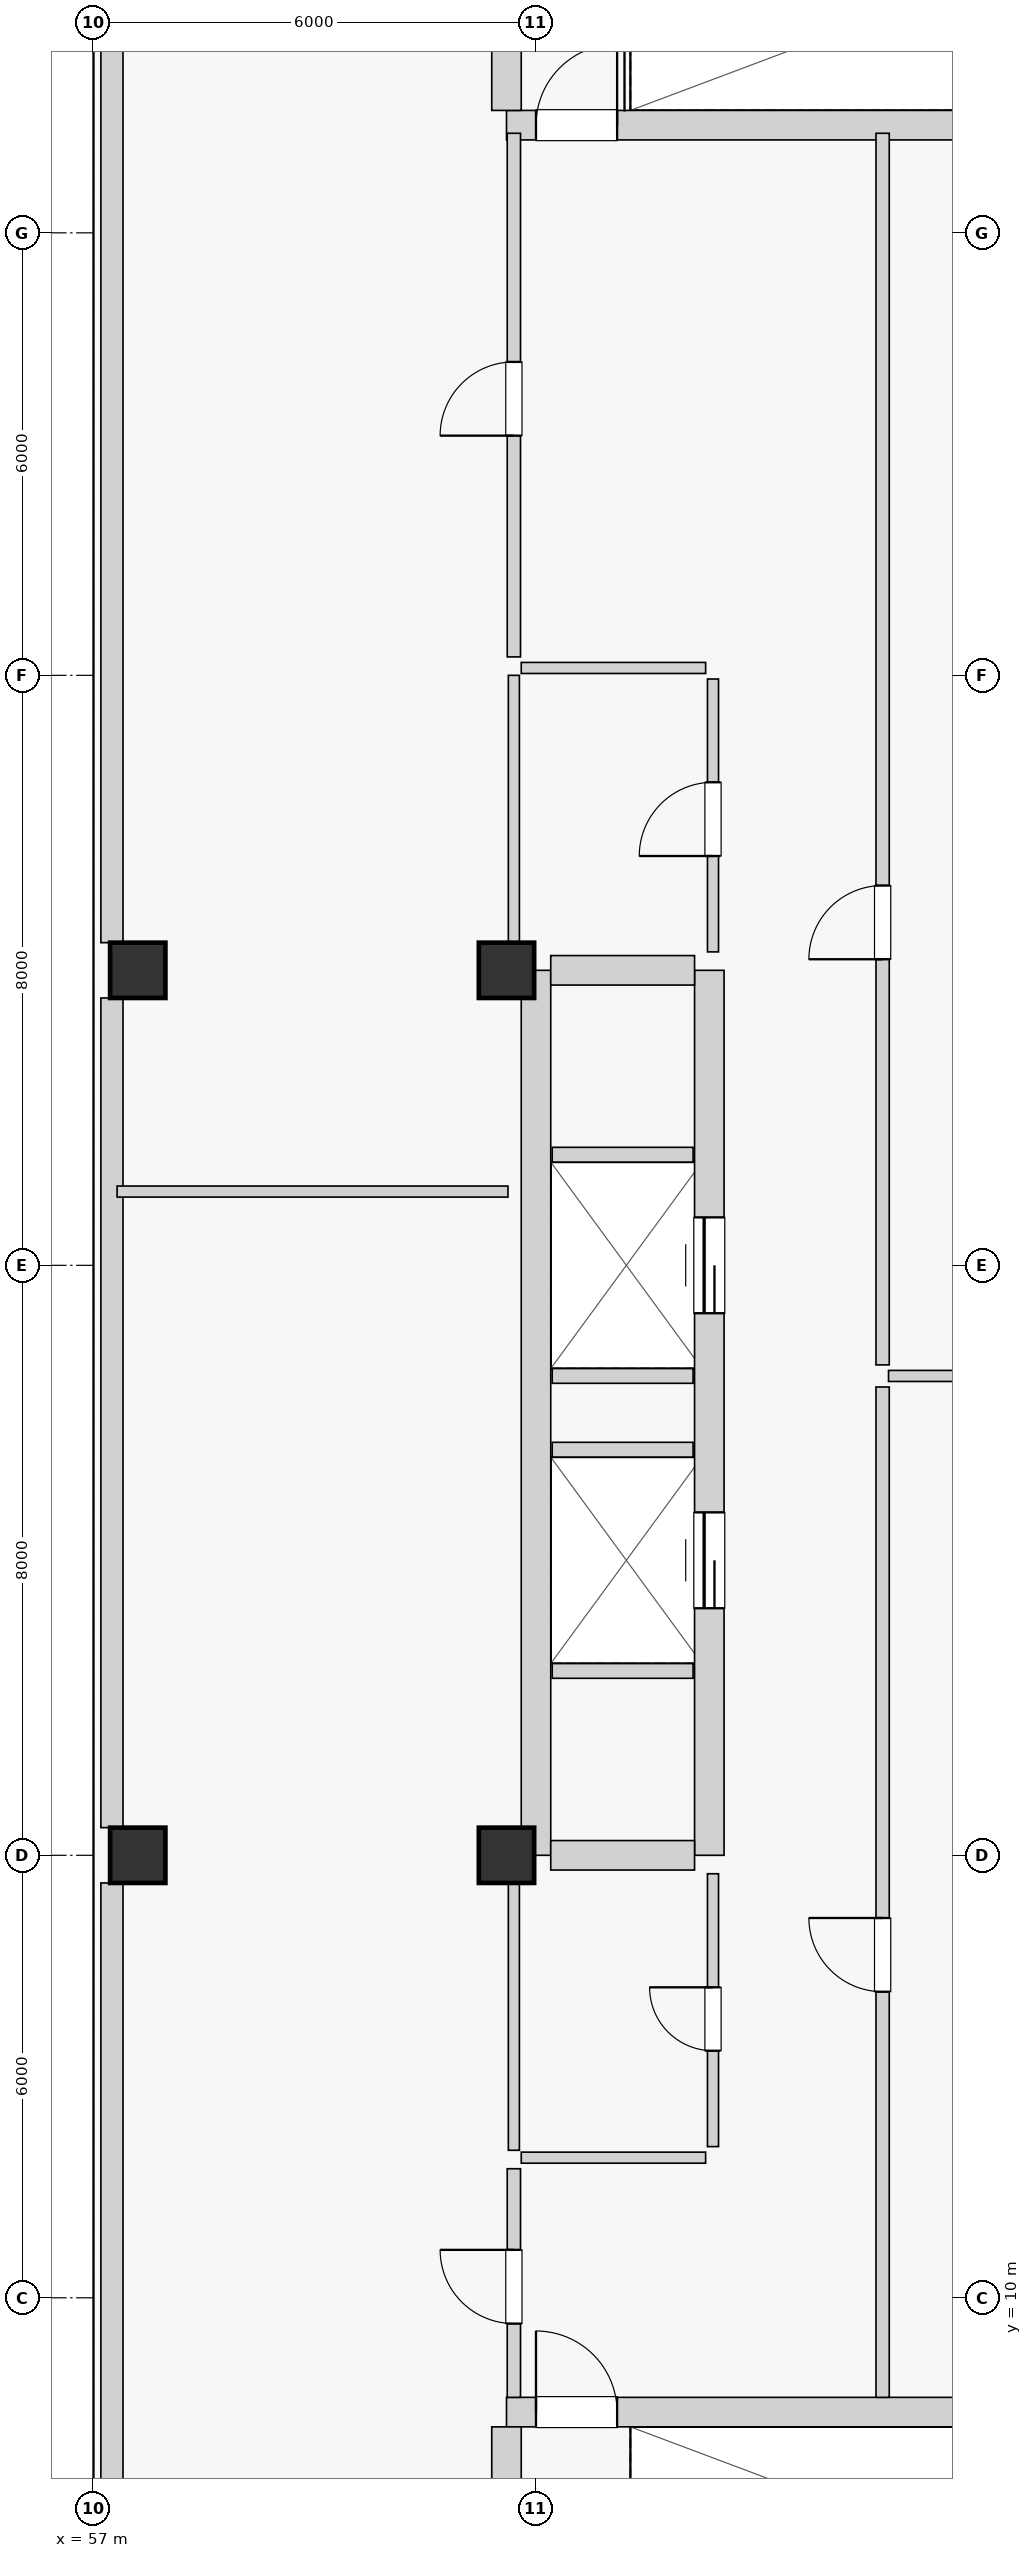
"""IFC4 building model, lengths in metres.
Left out: names, types, materials, properties, quantities, classifications, styles, units other than length and angle.
Written with IfcOpenShell. Run it as: python <this file> out.ifc"""

import sys

from ifc_helpers import new_model, si_unit, direction, frame, frame_2d, origin, origin_2d, place, context, subcontext, project, spatial, rectangle, extrude, source, transform, mapped, element, fill, save


model = new_model("IFC4")
c1 = context("Model", 3, precision=1e-05, world=origin(), true_north=direction((0.0, 1.0)))
c2 = subcontext(c1, "Body", "Model", "MODEL_VIEW")
j1 = project(units=[si_unit("LENGTHUNIT", "METRE"), si_unit("PLANEANGLEUNIT", "RADIAN")], contexts=[c1])
p1 = place(None, origin())
s1 = spatial("IfcSite", under=j1, at=p1, CompositionType="ELEMENT")
p2 = place(p1, origin())
s2 = spatial("IfcBuilding", under=s1, at=p2, CompositionType="ELEMENT")
p3 = place(p2, frame((0.0, 0.0, 18.4)))
s3 = spatial("IfcBuildingStorey", under=s2, at=p3, CompositionType="ELEMENT", Elevation=18.4)
for number, where, z_axis, x_axis in (
    (1, (57.6, 16.0, 0.0), (0.0, 0.0, 1.0), (1.0, 0.0, 0.0)),
    (2, (57.6, 28.0, 0.0), (0.0, 0.0, 1.0), (1.0, 0.0, 0.0)),
    (3, (62.6, 16.0, 0.0), (0.0, 0.0, 1.0), (1.0, 0.0, 0.0)),
    (4, (62.6, 28.0, 0.0), (0.0, 0.0, 1.0), (1.0, 0.0, 0.0)),
):
    element("IfcColumn", number, at=place(p3, frame(where, z_axis=z_axis, x_axis=x_axis)), inside=s3, PredefinedType="COLUMN", context=c2, shape_type="SweptSolid", body=[
        extrude(rectangle(XDim=0.75, YDim=0.75, at=origin_2d()), origin(), (0.0, 0.0, 1.0), 4.4),
    ])
p4 = place(p3, frame((57.25, 43.6, 0.0), z_axis=(0.0, 0.0, 1.0), x_axis=(0.0, -1.0, 0.0)))
e5 = element("IfcWall", 5, at=p4, inside=s3, PredefinedType="SOLIDWALL", context=c2, shape_type="SweptSolid", body=[
    extrude(rectangle(XDim=15.225, YDim=0.3, at=frame_2d((7.613, 0.0))), origin(), (0.0, 0.0, 1.0), 3.39),
])
p5 = place(p4, frame((7.0, 0.0, 0.85)))
e6 = element("IfcOpeningElement", 6, at=p5, cuts=e5, PredefinedType="OPENING", context=c2, shape_type="SweptSolid", body=[
    extrude(rectangle(XDim=1.8, YDim=1.65, at=frame_2d((0.9, 0.825))), frame((0.0, 0.16, 0.0), z_axis=(0.0, -1.0, 0.0), x_axis=(1.0, 0.0, 0.0)), (0.0, 0.0, 1.0), 0.32),
])
p6 = place(p3, frame((57.25, 27.625, 0.0), z_axis=(0.0, 0.0, 1.0), x_axis=(0.0, -1.0, 0.0)))
e7 = element("IfcWall", 7, at=p6, inside=s3, PredefinedType="SOLIDWALL", context=c2, shape_type="SweptSolid", body=[
    extrude(rectangle(XDim=11.25, YDim=0.3, at=frame_2d((5.625, 0.0))), origin(), (0.0, 0.0, 1.0), 3.39),
])
p7 = place(p6, frame((4.725, 0.0, 0.85)))
e8 = element("IfcOpeningElement", 8, at=p7, cuts=e7, PredefinedType="OPENING", context=c2, shape_type="SweptSolid", body=[
    extrude(rectangle(XDim=1.8, YDim=1.65, at=frame_2d((0.9, 0.825))), frame((0.0, 0.16, 0.0), z_axis=(0.0, -1.0, 0.0), x_axis=(1.0, 0.0, 0.0)), (0.0, 0.0, 1.0), 0.32),
])
p8 = place(p3, frame((57.25, 15.625, 0.0), z_axis=(0.0, 0.0, 1.0), x_axis=(0.0, -1.0, 0.0)))
e9 = element("IfcWall", 9, at=p8, inside=s3, PredefinedType="SOLIDWALL", context=c2, shape_type="SweptSolid", body=[
    extrude(rectangle(XDim=11.225, YDim=0.3, at=frame_2d((5.613, 0.0))), origin(), (0.0, 0.0, 1.0), 3.39),
])
p9 = place(p8, frame((4.125, 0.0, 0.85)))
e10 = element("IfcOpeningElement", 10, at=p9, cuts=e9, PredefinedType="OPENING", context=c2, shape_type="SweptSolid", body=[
    extrude(rectangle(XDim=2.4, YDim=1.8, at=frame_2d((1.2, 0.9))), frame((0.0, 0.16, 0.0), z_axis=(0.0, -1.0, 0.0), x_axis=(1.0, 0.0, 0.0)), (0.0, 0.0, 1.0), 0.32),
])
p10 = place(p3, frame((63.0, 16.0, 0.0), z_axis=(0.0, 0.0, 1.0), x_axis=(0.0, 1.0, 0.0)))
e11 = element("IfcWall", 11, at=p10, inside=s3, PredefinedType="SHEAR", context=c2, shape_type="SweptSolid", body=[
    extrude(rectangle(XDim=12.0, YDim=0.4, at=frame_2d((6.0, 0.0))), origin(), (0.0, 0.0, 1.0), 4.14),
])
p11 = place(p3, frame((65.35, 16.0, 0.0), z_axis=(0.0, 0.0, 1.0), x_axis=(0.0, 1.0, 0.0)))
e12 = element("IfcWall", 12, at=p11, inside=s3, PredefinedType="SHEAR", context=c2, shape_type="SweptSolid", body=[
    extrude(rectangle(XDim=12.0, YDim=0.4, at=frame_2d((6.0, 0.0))), origin(), (0.0, 0.0, 1.0), 4.14),
])
p12 = place(p11, frame((3.35, 0.0, 0.0)))
e13 = element("IfcOpeningElement", 13, at=p12, cuts=e12, PredefinedType="OPENING", context=c2, shape_type="SweptSolid", body=[
    extrude(rectangle(XDim=1.3, YDim=2.25, at=frame_2d((0.65, 1.125))), frame((0.0, 0.21, 0.0), z_axis=(0.0, -1.0, 0.0), x_axis=(1.0, 0.0, 0.0)), (0.0, 0.0, 1.0), 0.42),
])
p13 = place(p11, frame((7.35, 0.0, 0.0)))
e14 = element("IfcOpeningElement", 14, at=p13, cuts=e12, PredefinedType="OPENING", context=c2, shape_type="SweptSolid", body=[
    extrude(rectangle(XDim=1.3, YDim=2.25, at=frame_2d((0.65, 1.125))), frame((0.0, 0.21, 0.0), z_axis=(0.0, -1.0, 0.0), x_axis=(1.0, 0.0, 0.0)), (0.0, 0.0, 1.0), 0.42),
])
for number, where, z_axis, x_axis in (
    (15, (63.2, 16.0, 0.0), (0.0, 0.0, 1.0), (1.0, 0.0, 0.0)),
    (16, (63.2, 28.0, 0.0), (0.0, 0.0, 1.0), (1.0, 0.0, 0.0)),
):
    element("IfcWall", number, at=place(p3, frame(where, z_axis=z_axis, x_axis=x_axis)), inside=s3, PredefinedType="SHEAR", context=c2, shape_type="SweptSolid", body=[
        extrude(rectangle(XDim=1.95, YDim=0.4, at=frame_2d((0.975, 0.0))), origin(), (0.0, 0.0, 1.0), 4.14),
    ])
for number, where, z_axis, x_axis in (
    (17, (63.22, 18.5, 0.0), (0.0, 0.0, 1.0), (1.0, 0.0, 0.0)),
    (18, (63.22, 21.5, 0.0), (0.0, 0.0, 1.0), (1.0, 0.0, 0.0)),
    (19, (63.22, 22.5, 0.0), (0.0, 0.0, 1.0), (1.0, 0.0, 0.0)),
    (20, (63.22, 25.5, 0.0), (0.0, 0.0, 1.0), (1.0, 0.0, 0.0)),
):
    element("IfcWall", number, at=place(p3, frame(where, z_axis=z_axis, x_axis=x_axis)), inside=s3, PredefinedType="SOLIDWALL", context=c2, shape_type="SweptSolid", body=[
        extrude(rectangle(XDim=1.91, YDim=0.2, at=frame_2d((0.955, 0.0))), origin(), (0.0, 0.0, 1.0), 4.14),
    ])
p14 = place(p3, frame((62.6, 8.45, 0.0), z_axis=(0.0, 0.0, 1.0), x_axis=(1.0, 0.0, 0.0)))
e21 = element("IfcWall", 21, at=p14, inside=s3, PredefinedType="SHEAR", context=c2, shape_type="SweptSolid", body=[
    extrude(rectangle(XDim=10.0, YDim=0.4, at=frame_2d((5.0, 0.0))), origin(), (0.0, 0.0, 1.0), 4.14),
])
p15 = place(p14, frame((0.4, 0.0, 0.0)))
e22 = element("IfcOpeningElement", 22, at=p15, cuts=e21, PredefinedType="OPENING", context=c2, shape_type="SweptSolid", body=[
    extrude(rectangle(XDim=1.1, YDim=2.03, at=frame_2d((0.55, 1.015))), frame((0.0, 0.21, 0.0), z_axis=(0.0, -1.0, 0.0), x_axis=(1.0, 0.0, 0.0)), (0.0, 0.0, 1.0), 0.42),
])
p16 = place(p3, frame((62.6, 5.2, 0.0), z_axis=(0.0, 0.0, 1.0), x_axis=(0.0, 1.0, 0.0)))
e23 = element("IfcWall", 23, at=p16, inside=s3, PredefinedType="SHEAR", context=c2, shape_type="SweptSolid", body=[
    extrude(rectangle(XDim=3.05, YDim=0.4, at=frame_2d((1.525, 0.0))), origin(), (0.0, 0.0, 1.0), 4.14),
])
p17 = place(p3, frame((62.6, 39.46, 0.0), z_axis=(0.0, 0.0, 1.0), x_axis=(1.0, 0.0, 0.0)))
e24 = element("IfcWall", 24, at=p17, inside=s3, PredefinedType="SHEAR", context=c2, shape_type="SweptSolid", body=[
    extrude(rectangle(XDim=10.0, YDim=0.4, at=frame_2d((5.0, 0.0))), origin(), (0.0, 0.0, 1.0), 4.14),
])
p18 = place(p17, frame((0.4, 0.0, 0.0)))
e25 = element("IfcOpeningElement", 25, at=p18, cuts=e24, PredefinedType="OPENING", context=c2, shape_type="SweptSolid", body=[
    extrude(rectangle(XDim=1.1, YDim=2.03, at=frame_2d((0.55, 1.015))), frame((0.0, 0.21, 0.0), z_axis=(0.0, -1.0, 0.0), x_axis=(1.0, 0.0, 0.0)), (0.0, 0.0, 1.0), 0.42),
])
p19 = place(p3, frame((62.6, 39.66, 0.0), z_axis=(0.0, 0.0, 1.0), x_axis=(0.0, 1.0, 0.0)))
e26 = element("IfcWall", 26, at=p19, inside=s3, PredefinedType="SHEAR", context=c2, shape_type="SweptSolid", body=[
    extrude(rectangle(XDim=3.05, YDim=0.4, at=frame_2d((1.525, 0.0))), origin(), (0.0, 0.0, 1.0), 4.14),
])
p20 = place(p3, frame((62.8, 11.9, 0.0), z_axis=(0.0, 0.0, 1.0), x_axis=(1.0, 0.0, 0.0)))
e27 = element("IfcWall", 27, at=p20, inside=s3, PredefinedType="PARTITIONING", context=c2, shape_type="SweptSolid", body=[
    extrude(rectangle(XDim=2.5, YDim=0.15, at=frame_2d((1.25, 0.0))), origin(), (0.0, 0.0, 1.0), 4.14),
])
p21 = place(p3, frame((62.7, 12.0, 0.0), z_axis=(0.0, 0.0, 1.0), x_axis=(0.0, 1.0, 0.0)))
e28 = element("IfcWall", 28, at=p21, inside=s3, PredefinedType="PARTITIONING", context=c2, shape_type="SweptSolid", body=[
    extrude(rectangle(XDim=3.8, YDim=0.15, at=frame_2d((1.9, 0.0))), origin(), (0.0, 0.0, 1.0), 3.54),
])
p22 = place(p3, frame((65.4, 12.05, 0.0), z_axis=(0.0, 0.0, 1.0), x_axis=(0.0, 1.0, 0.0)))
e29 = element("IfcWall", 29, at=p22, inside=s3, PredefinedType="PARTITIONING", context=c2, shape_type="SweptSolid", body=[
    extrude(rectangle(XDim=3.7, YDim=0.15, at=frame_2d((1.85, 0.0))), origin(), (0.0, 0.0, 1.0), 4.14),
])
p23 = place(p22, frame((1.3, 0.0, 0.0)))
e30 = element("IfcOpeningElement", 30, at=p23, cuts=e29, PredefinedType="OPENING", context=c2, shape_type="SweptSolid", body=[
    extrude(rectangle(XDim=0.86, YDim=2.01, at=frame_2d((0.43, 1.005))), frame((0.0, 0.085, 0.0), z_axis=(0.0, -1.0, 0.0), x_axis=(1.0, 0.0, 0.0)), (0.0, 0.0, 1.0), 0.17),
])
p24 = place(p3, frame((62.8, 32.1, 0.0), z_axis=(0.0, 0.0, 1.0), x_axis=(1.0, 0.0, 0.0)))
e31 = element("IfcWall", 31, at=p24, inside=s3, PredefinedType="PARTITIONING", context=c2, shape_type="SweptSolid", body=[
    extrude(rectangle(XDim=2.5, YDim=0.15, at=frame_2d((1.25, 0.0))), origin(), (0.0, 0.0, 1.0), 4.14),
])
p25 = place(p3, frame((62.7, 28.2, 0.0), z_axis=(0.0, 0.0, 1.0), x_axis=(0.0, 1.0, 0.0)))
e32 = element("IfcWall", 32, at=p25, inside=s3, PredefinedType="PARTITIONING", context=c2, shape_type="SweptSolid", body=[
    extrude(rectangle(XDim=3.8, YDim=0.15, at=frame_2d((1.9, 0.0))), origin(), (0.0, 0.0, 1.0), 3.54),
])
p26 = place(p3, frame((65.4, 28.25, 0.0), z_axis=(0.0, 0.0, 1.0), x_axis=(0.0, 1.0, 0.0)))
e33 = element("IfcWall", 33, at=p26, inside=s3, PredefinedType="PARTITIONING", context=c2, shape_type="SweptSolid", body=[
    extrude(rectangle(XDim=3.7, YDim=0.15, at=frame_2d((1.85, 0.0))), origin(), (0.0, 0.0, 1.0), 4.14),
])
p27 = place(p26, frame((1.3, 0.0, 0.0)))
e34 = element("IfcOpeningElement", 34, at=p27, cuts=e33, PredefinedType="OPENING", context=c2, shape_type="SweptSolid", body=[
    extrude(rectangle(XDim=1.0, YDim=2.01, at=frame_2d((0.5, 1.005))), frame((0.0, 0.085, 0.0), z_axis=(0.0, -1.0, 0.0), x_axis=(1.0, 0.0, 0.0)), (0.0, 0.0, 1.0), 0.17),
])
p28 = place(p3, frame((62.7, 8.65, 0.0), z_axis=(0.0, 0.0, 1.0), x_axis=(0.0, 1.0, 0.0)))
e35 = element("IfcWall", 35, at=p28, inside=s3, PredefinedType="PARTITIONING", context=c2, shape_type="SweptSolid", body=[
    extrude(rectangle(XDim=3.1, YDim=0.18, at=frame_2d((1.55, 0.0))), origin(), (0.0, 0.0, 1.0), 3.54),
])
p29 = place(p28, frame((1.0, 0.0, 0.0)))
e36 = element("IfcOpeningElement", 36, at=p29, cuts=e35, PredefinedType="OPENING", context=c2, shape_type="SweptSolid", body=[
    extrude(rectangle(XDim=1.0, YDim=2.01, at=frame_2d((0.5, 1.005))), frame((0.0, 0.1, 0.0), z_axis=(0.0, -1.0, 0.0), x_axis=(1.0, 0.0, 0.0)), (0.0, 0.0, 1.0), 0.2),
])
p30 = place(p3, frame((62.7, 32.25, 0.0), z_axis=(0.0, 0.0, 1.0), x_axis=(0.0, 1.0, 0.0)))
e37 = element("IfcWall", 37, at=p30, inside=s3, PredefinedType="PARTITIONING", context=c2, shape_type="SweptSolid", body=[
    extrude(rectangle(XDim=7.1, YDim=0.18, at=frame_2d((3.55, 0.0))), origin(), (0.0, 0.0, 1.0), 3.54),
])
p31 = place(p30, frame((3.0, 0.0, 0.0)))
e38 = element("IfcOpeningElement", 38, at=p31, cuts=e37, PredefinedType="OPENING", context=c2, shape_type="SweptSolid", body=[
    extrude(rectangle(XDim=1.0, YDim=2.01, at=frame_2d((0.5, 1.005))), frame((0.0, 0.1, 0.0), z_axis=(0.0, -1.0, 0.0), x_axis=(1.0, 0.0, 0.0)), (0.0, 0.0, 1.0), 0.2),
])
p32 = place(p3, frame((57.32, 25.0, 0.0), z_axis=(0.0, 0.0, 1.0), x_axis=(1.0, 0.0, 0.0)))
e39 = element("IfcWall", 39, at=p32, inside=s3, PredefinedType="PARTITIONING", context=c2, shape_type="SweptSolid", body=[
    extrude(rectangle(XDim=5.3, YDim=0.15, at=frame_2d((2.65, 0.0))), origin(), (0.0, 0.0, 1.0), 4.14),
])
p33 = place(p3, frame((67.7, 8.65, 0.0), z_axis=(0.0, 0.0, 1.0), x_axis=(0.0, 1.0, 0.0)))
e40 = element("IfcWall", 40, at=p33, inside=s3, PredefinedType="PARTITIONING", context=c2, shape_type="SweptSolid", body=[
    extrude(rectangle(XDim=13.7, YDim=0.18, at=frame_2d((6.85, 0.0))), origin(), (0.0, 0.0, 1.0), 4.14),
])
p34 = place(p33, frame((5.5, 0.0, 0.0)))
e41 = element("IfcOpeningElement", 41, at=p34, cuts=e40, PredefinedType="OPENING", context=c2, shape_type="SweptSolid", body=[
    extrude(rectangle(XDim=1.0, YDim=2.01, at=frame_2d((0.5, 1.005))), frame((0.0, 0.1, 0.0), z_axis=(0.0, -1.0, 0.0), x_axis=(1.0, 0.0, 0.0)), (0.0, 0.0, 1.0), 0.2),
])
p35 = place(p3, frame((67.7, 22.65, 0.0), z_axis=(0.0, 0.0, 1.0), x_axis=(0.0, 1.0, 0.0)))
e42 = element("IfcWall", 42, at=p35, inside=s3, PredefinedType="PARTITIONING", context=c2, shape_type="SweptSolid", body=[
    extrude(rectangle(XDim=16.7, YDim=0.18, at=frame_2d((8.35, 0.0))), origin(), (0.0, 0.0, 1.0), 4.14),
])
p36 = place(p35, frame((5.5, 0.0, 0.0)))
e43 = element("IfcOpeningElement", 43, at=p36, cuts=e42, PredefinedType="OPENING", context=c2, shape_type="SweptSolid", body=[
    extrude(rectangle(XDim=1.0, YDim=2.01, at=frame_2d((0.5, 1.005))), frame((0.0, 0.1, 0.0), z_axis=(0.0, -1.0, 0.0), x_axis=(1.0, 0.0, 0.0)), (0.0, 0.0, 1.0), 0.2),
])
p37 = place(p3, frame((67.78, 22.5, 0.0), z_axis=(0.0, 0.0, 1.0), x_axis=(1.0, 0.0, 0.0)))
e44 = element("IfcWall", 44, at=p37, inside=s3, PredefinedType="PARTITIONING", context=c2, shape_type="SweptSolid", body=[
    extrude(rectangle(XDim=6.9, YDim=0.15, at=frame_2d((3.45, 0.0))), origin(), (0.0, 0.0, 1.0), 4.14),
])
m1 = source(origin(), c2, "Body", "SweptSolid", [
    extrude(rectangle(XDim=1.8, YDim=1.65, at=frame_2d((0.9, 0.825))), frame((0.0, 0.03, 0.0), z_axis=(0.0, -1.0, 0.0), x_axis=(1.0, 0.0, 0.0)), (0.0, 0.0, 1.0), 0.06),
])
p38 = place(p5, origin())
e45 = element("IfcWindow", 45, at=p38, inside=s3, PartitioningType="DOUBLE_PANEL_VERTICAL", PredefinedType="WINDOW", context=c2, shape_type="MappedRepresentation", body=[
    mapped(m1, transform((0.0, 0.0, 0.0), scale=1.0)),
])
fill(e6, e45)
p39 = place(p7, origin())
e46 = element("IfcWindow", 46, at=p39, inside=s3, PartitioningType="DOUBLE_PANEL_VERTICAL", PredefinedType="WINDOW", context=c2, shape_type="MappedRepresentation", body=[
    mapped(m1, transform((0.0, 0.0, 0.0), scale=1.0)),
])
fill(e8, e46)
m2 = source(origin(), c2, "Body", "SweptSolid", [
    extrude(rectangle(XDim=2.4, YDim=1.8, at=frame_2d((1.2, 0.9))), frame((0.0, 0.03, 0.0), z_axis=(0.0, -1.0, 0.0), x_axis=(1.0, 0.0, 0.0)), (0.0, 0.0, 1.0), 0.06),
])
p40 = place(p9, origin())
e47 = element("IfcWindow", 47, at=p40, inside=s3, PartitioningType="SINGLE_PANEL", PredefinedType="WINDOW", context=c2, shape_type="MappedRepresentation", body=[
    mapped(m2, transform((0.0, 0.0, 0.0), scale=1.0)),
])
fill(e10, e47)
m3 = source(origin(), c2, "Body", "SweptSolid", [
    extrude(rectangle(XDim=1.3, YDim=2.25, at=frame_2d((0.65, 1.125))), frame((0.0, 0.025, 0.0), z_axis=(0.0, -1.0, 0.0), x_axis=(1.0, 0.0, 0.0)), (0.0, 0.0, 1.0), 0.05),
])
p41 = place(p12, origin())
e48 = element("IfcDoor", 48, at=p41, inside=s3, OperationType="SLIDING_TO_LEFT", PredefinedType="DOOR", context=c2, shape_type="MappedRepresentation", body=[
    mapped(m3, transform((0.0, 0.0, 0.0), scale=1.0)),
])
fill(e13, e48)
p42 = place(p13, origin())
e49 = element("IfcDoor", 49, at=p42, inside=s3, OperationType="SLIDING_TO_LEFT", PredefinedType="DOOR", context=c2, shape_type="MappedRepresentation", body=[
    mapped(m3, transform((0.0, 0.0, 0.0), scale=1.0)),
])
fill(e14, e49)
m4 = source(origin(), c2, "Body", "SweptSolid", [
    extrude(rectangle(XDim=1.1, YDim=2.03, at=frame_2d((0.55, 1.015))), frame((0.0, 0.025, 0.0), z_axis=(0.0, -1.0, 0.0), x_axis=(1.0, 0.0, 0.0)), (0.0, 0.0, 1.0), 0.05),
])
p43 = place(p15, origin())
e50 = element("IfcDoor", 50, at=p43, inside=s3, OperationType="SINGLE_SWING_LEFT", PredefinedType="DOOR", context=c2, shape_type="MappedRepresentation", body=[
    mapped(m4, transform((0.0, 0.0, 0.0), scale=1.0)),
])
fill(e22, e50)
p44 = place(p18, origin())
e51 = element("IfcDoor", 51, at=p44, inside=s3, OperationType="SINGLE_SWING_RIGHT", PredefinedType="DOOR", context=c2, shape_type="MappedRepresentation", body=[
    mapped(m4, transform((0.0, 0.0, 0.0), scale=1.0)),
])
fill(e25, e51)
m5 = source(origin(), c2, "Body", "SweptSolid", [
    extrude(rectangle(XDim=0.86, YDim=2.01, at=frame_2d((0.43, 1.005))), frame((0.0, 0.025, 0.0), z_axis=(0.0, -1.0, 0.0), x_axis=(1.0, 0.0, 0.0)), (0.0, 0.0, 1.0), 0.05),
])
p45 = place(p23, origin())
e52 = element("IfcDoor", 52, at=p45, inside=s3, OperationType="SINGLE_SWING_RIGHT", PredefinedType="DOOR", context=c2, shape_type="MappedRepresentation", body=[
    mapped(m5, transform((0.0, 0.0, 0.0), scale=1.0)),
])
fill(e30, e52)
m6 = source(origin(), c2, "Body", "SweptSolid", [
    extrude(rectangle(XDim=1.0, YDim=2.01, at=frame_2d((0.5, 1.005))), frame((0.0, 0.025, 0.0), z_axis=(0.0, -1.0, 0.0), x_axis=(1.0, 0.0, 0.0)), (0.0, 0.0, 1.0), 0.05),
])
p46 = place(p27, origin())
e53 = element("IfcDoor", 53, at=p46, inside=s3, OperationType="SINGLE_SWING_LEFT", PredefinedType="DOOR", context=c2, shape_type="MappedRepresentation", body=[
    mapped(m6, transform((0.0, 0.0, 0.0), scale=1.0)),
])
fill(e34, e53)
p47 = place(p29, origin())
e54 = element("IfcDoor", 54, at=p47, inside=s3, OperationType="SINGLE_SWING_RIGHT", PredefinedType="DOOR", context=c2, shape_type="MappedRepresentation", body=[
    mapped(m6, transform((0.0, 0.0, 0.0), scale=1.0)),
])
fill(e36, e54)
p48 = place(p31, origin())
e55 = element("IfcDoor", 55, at=p48, inside=s3, OperationType="SINGLE_SWING_LEFT", PredefinedType="DOOR", context=c2, shape_type="MappedRepresentation", body=[
    mapped(m6, transform((0.0, 0.0, 0.0), scale=1.0)),
])
fill(e38, e55)
p49 = place(p34, origin())
e56 = element("IfcDoor", 56, at=p49, inside=s3, OperationType="SINGLE_SWING_RIGHT", PredefinedType="DOOR", context=c2, shape_type="MappedRepresentation", body=[
    mapped(m6, transform((0.0, 0.0, 0.0), scale=1.0)),
])
fill(e41, e56)
p50 = place(p36, origin())
e57 = element("IfcDoor", 57, at=p50, inside=s3, OperationType="SINGLE_SWING_LEFT", PredefinedType="DOOR", context=c2, shape_type="MappedRepresentation", body=[
    mapped(m6, transform((0.0, 0.0, 0.0), scale=1.0)),
])
fill(e43, e57)
save(model, sys.argv[1])
